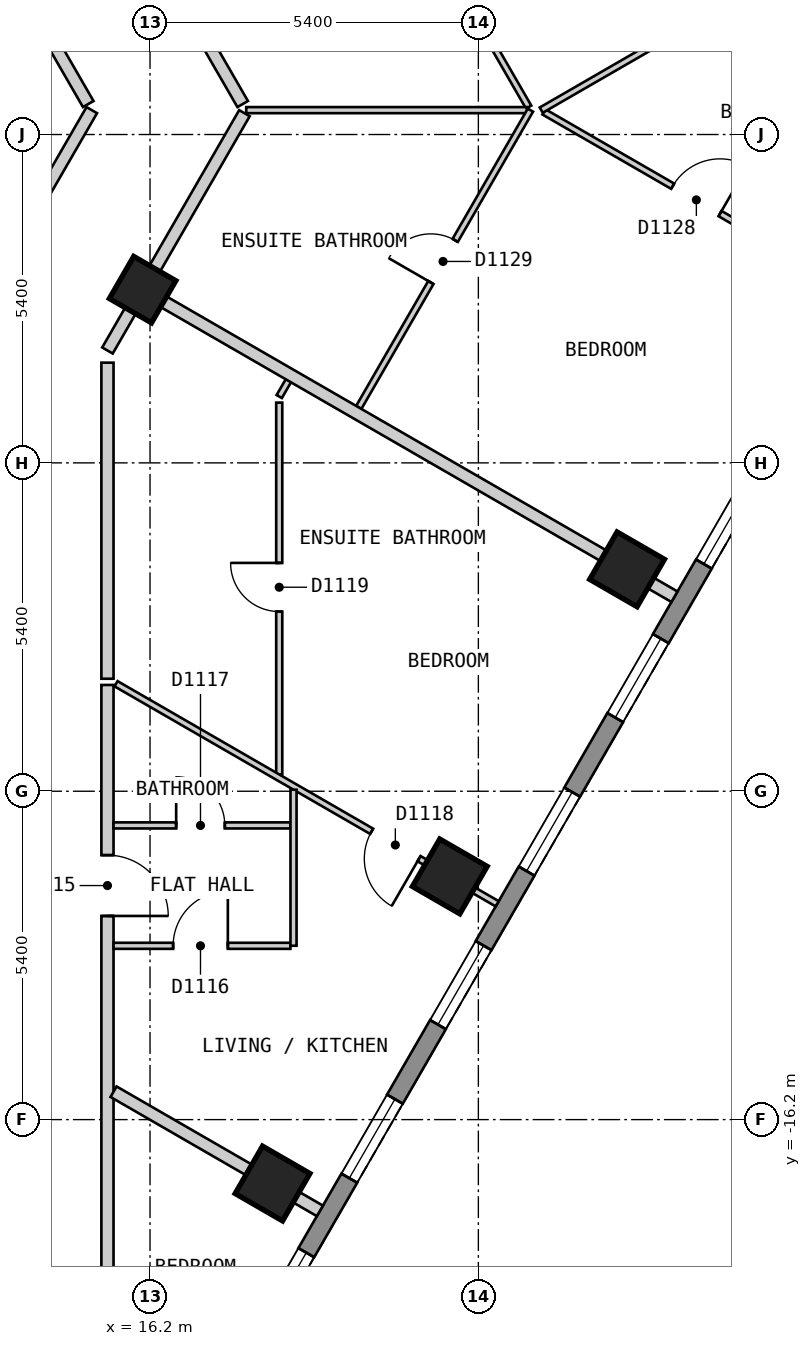
"""IFC4 building model, lengths in metres.
Left out: names, types, materials, properties, quantities, classifications, styles, units other than length and angle.
Written with IfcOpenShell. Run it as: python <this file> out.ifc"""

import sys

from ifc_helpers import new_model, si_unit, direction, frame, frame_2d, origin, origin_2d, place, context, subcontext, project, spatial, polyline, rectangle, outline, extrude, element, fill, save


model = new_model("IFC4")
c1 = context("Model", 3, precision=1e-05, world=origin(), true_north=direction((0.0, 1.0)))
c2 = subcontext(c1, "Body", "Model", "MODEL_VIEW")
j1 = project(units=[si_unit("LENGTHUNIT", "METRE"), si_unit("PLANEANGLEUNIT", "RADIAN")], contexts=[c1])
p1 = place(None, origin())
s1 = spatial("IfcSite", under=j1, at=p1, CompositionType="ELEMENT")
p2 = place(p1, origin())
s2 = spatial("IfcBuilding", under=s1, at=p2, CompositionType="ELEMENT")
p3 = place(p2, frame((0.0, 0.0, 138.6)))
s3 = spatial("IfcBuildingStorey", under=s2, at=p3, CompositionType="ELEMENT", Elevation=138.6)
for number, where, z_axis, x_axis in (
    (1, (18.215, -17.251, 0.0), (0.0, 0.0, 1.0), (0.5, 0.866, 0.0)),
    (2, (21.13, -12.201, 0.0), (0.0, 0.0, 1.0), (0.5, 0.866, 0.0)),
    (3, (24.046, -7.151, 0.0), (0.0, 0.0, 1.0), (0.5, 0.866, 0.0)),
):
    element("IfcColumn", number, at=place(p3, frame(where, z_axis=z_axis, x_axis=x_axis)), inside=s3, PredefinedType="COLUMN", context=c2, shape_type="SweptSolid", body=[
        extrude(rectangle(XDim=0.9, YDim=0.9, at=origin_2d()), origin(), (0.0, 0.0, 1.0), 3.0),
    ])
p4 = place(p3, frame((16.078, -2.551, 0.0), z_axis=(0.0, 0.0, 1.0), x_axis=(0.5, 0.866025403784, 0.0)))
e4 = element("IfcColumn", 4, at=p4, inside=s3, PredefinedType="COLUMN", context=c2, shape_type="SweptSolid", body=[
    extrude(rectangle(XDim=0.8, YDim=0.8, at=origin_2d()), origin(), (0.0, 0.0, 1.0), 3.0),
])
p5 = place(p3, frame((15.862, -23.425, 0.0), z_axis=(0.0, 0.0, 1.0), x_axis=(0.500017503135, 0.866015298109, 0.0)))
e5 = element("IfcWall", 5, at=p5, inside=s3, PredefinedType="SOLIDWALL", context=c2, shape_type="SweptSolid", body=[
    extrude(outline(polyline([(0.0, -0.15), (24.711, -0.15), (24.631, 0.15), (0.08, 0.15), (0.0, -0.15)])), origin(), (0.0, 0.0, 1.0), 2.7),
])
p6 = place(p5, frame((1.4, 0.0, 0.15)))
e6 = element("IfcOpeningElement", 6, at=p6, cuts=e5, PredefinedType="OPENING", context=c2, shape_type="SweptSolid", body=[
    extrude(rectangle(XDim=1.5, YDim=2.1, at=frame_2d((0.75, 1.05))), frame((0.0, 0.16, 0.0), z_axis=(0.0, -1.0, 0.0), x_axis=(1.0, 0.0, 0.0)), (0.0, 0.0, 1.0), 0.32),
])
p7 = place(p5, frame((4.316, 0.0, 0.15)))
e7 = element("IfcOpeningElement", 7, at=p7, cuts=e5, PredefinedType="OPENING", context=c2, shape_type="SweptSolid", body=[
    extrude(rectangle(XDim=1.5, YDim=2.1, at=frame_2d((0.75, 1.05))), frame((0.0, 0.16, 0.0), z_axis=(0.0, -1.0, 0.0), x_axis=(1.0, 0.0, 0.0)), (0.0, 0.0, 1.0), 0.32),
])
p8 = place(p5, frame((7.231, 0.0, 0.15)))
e8 = element("IfcOpeningElement", 8, at=p8, cuts=e5, PredefinedType="OPENING", context=c2, shape_type="SweptSolid", body=[
    extrude(rectangle(XDim=1.5, YDim=2.1, at=frame_2d((0.75, 1.05))), frame((0.0, 0.16, 0.0), z_axis=(0.0, -1.0, 0.0), x_axis=(1.0, 0.0, 0.0)), (0.0, 0.0, 1.0), 0.32),
])
p9 = place(p5, frame((10.147, 0.0, 0.15)))
e9 = element("IfcOpeningElement", 9, at=p9, cuts=e5, PredefinedType="OPENING", context=c2, shape_type="SweptSolid", body=[
    extrude(rectangle(XDim=1.5, YDim=2.1, at=frame_2d((0.75, 1.05))), frame((0.0, 0.16, 0.0), z_axis=(0.0, -1.0, 0.0), x_axis=(1.0, 0.0, 0.0)), (0.0, 0.0, 1.0), 0.32),
])
p10 = place(p5, frame((13.062, 0.0, 0.15)))
e10 = element("IfcOpeningElement", 10, at=p10, cuts=e5, PredefinedType="OPENING", context=c2, shape_type="SweptSolid", body=[
    extrude(rectangle(XDim=1.5, YDim=2.1, at=frame_2d((0.75, 1.05))), frame((0.0, 0.16, 0.0), z_axis=(0.0, -1.0, 0.0), x_axis=(1.0, 0.0, 0.0)), (0.0, 0.0, 1.0), 0.32),
])
p11 = place(p5, frame((15.977, 0.0, 0.15)))
e11 = element("IfcOpeningElement", 11, at=p11, cuts=e5, PredefinedType="OPENING", context=c2, shape_type="SweptSolid", body=[
    extrude(rectangle(XDim=1.5, YDim=2.1, at=frame_2d((0.75, 1.05))), frame((0.0, 0.16, 0.0), z_axis=(0.0, -1.0, 0.0), x_axis=(1.0, 0.0, 0.0)), (0.0, 0.0, 1.0), 0.32),
])
p12 = place(p5, frame((18.893, 0.0, 0.15)))
e12 = element("IfcOpeningElement", 12, at=p12, cuts=e5, PredefinedType="OPENING", context=c2, shape_type="SweptSolid", body=[
    extrude(rectangle(XDim=1.5, YDim=2.1, at=frame_2d((0.75, 1.05))), frame((0.0, 0.16, 0.0), z_axis=(0.0, -1.0, 0.0), x_axis=(1.0, 0.0, 0.0)), (0.0, 0.0, 1.0), 0.32),
])
p13 = place(p5, frame((21.809, 0.0, 0.15)))
e13 = element("IfcOpeningElement", 13, at=p13, cuts=e5, PredefinedType="OPENING", context=c2, shape_type="SweptSolid", body=[
    extrude(rectangle(XDim=1.5, YDim=2.1, at=frame_2d((0.75, 1.05))), frame((0.0, 0.16, 0.0), z_axis=(0.0, -1.0, 0.0), x_axis=(1.0, 0.0, 0.0)), (0.0, 0.0, 1.0), 0.32),
])
p14 = place(p3, frame((7.967, 13.0, 0.0), z_axis=(0.0, 0.0, 1.0), x_axis=(0.50003774998, -0.866003607726, 0.0)))
e14 = element("IfcWall", 14, at=p14, inside=s3, PredefinedType="PARTITIONING", context=c2, shape_type="SweptSolid", body=[
    extrude(rectangle(XDim=14.433, YDim=0.2, at=frame_2d((7.217, 0.0))), origin(), (0.0, 0.0, 1.0), 2.7),
])
p15 = place(p14, frame((6.824, 0.0, 0.0)))
e15 = element("IfcOpeningElement", 15, at=p15, cuts=e14, PredefinedType="OPENING", context=c2, shape_type="SweptSolid", body=[
    extrude(rectangle(XDim=0.9, YDim=2.1, at=frame_2d((0.45, 1.05))), frame((0.0, 0.11, 0.0), z_axis=(0.0, -1.0, 0.0), x_axis=(1.0, 0.0, 0.0)), (0.0, 0.0, 1.0), 0.22),
])
p16 = place(p3, frame((9.296, 15.1, 0.0), z_axis=(0.0, 0.0, 1.0), x_axis=(0.499974024244, -0.866040400375, 0.0)))
e16 = element("IfcWall", 16, at=p16, inside=s3, PredefinedType="PARTITIONING", context=c2, shape_type="SweptSolid", body=[
    extrude(rectangle(XDim=16.857, YDim=0.2, at=frame_2d((8.429, 0.0))), origin(), (0.0, 0.0, 1.0), 2.7),
])
p17 = place(p16, frame((11.522, 0.0, 0.0)))
e17 = element("IfcOpeningElement", 17, at=p17, cuts=e16, PredefinedType="OPENING", context=c2, shape_type="SweptSolid", body=[
    extrude(rectangle(XDim=1.0, YDim=2.1, at=frame_2d((0.5, 1.05))), frame((0.0, 0.11, 0.0), z_axis=(0.0, -1.0, 0.0), x_axis=(1.0, 0.0, 0.0)), (0.0, 0.0, 1.0), 0.22),
])
p18 = place(p3, frame((15.5, -3.752, 0.0), z_axis=(0.0, 0.0, 1.0), x_axis=(0.0, -1.0, 0.0)))
e18 = element("IfcWall", 18, at=p18, inside=s3, PredefinedType="PARTITIONING", context=c2, shape_type="SweptSolid", body=[
    extrude(rectangle(XDim=5.198, YDim=0.2, at=frame_2d((2.599, 0.0))), origin(), (0.0, 0.0, 1.0), 2.7),
])
p19 = place(p3, frame((13.394, -2.8, 0.0), z_axis=(0.0, 0.0, 1.0), x_axis=(0.499968324138, 0.866043691079, 0.0)))
e19 = element("IfcWall", 19, at=p19, inside=s3, PredefinedType="PARTITIONING", context=c2, shape_type="SweptSolid", body=[
    extrude(rectangle(XDim=3.696, YDim=0.2, at=frame_2d((1.848, 0.0))), origin(), (0.0, 0.0, 1.0), 2.7),
])
p20 = place(p3, frame((15.5, -3.552, 0.0), z_axis=(0.0, 0.0, 1.0), x_axis=(0.499914724673, 0.86607463192, 0.0)))
e20 = element("IfcWall", 20, at=p20, inside=s3, PredefinedType="PARTITIONING", context=c2, shape_type="SweptSolid", body=[
    extrude(rectangle(XDim=4.507, YDim=0.2, at=frame_2d((2.253, 0.0))), origin(), (0.0, 0.0, 1.0), 2.7),
])
p21 = place(p3, frame((15.5, -21.199, 0.0), z_axis=(0.0, 0.0, 1.0), x_axis=(0.0, 1.0, 0.0)))
e21 = element("IfcWall", 21, at=p21, inside=s3, PredefinedType="PARTITIONING", context=c2, shape_type="SweptSolid", body=[
    extrude(rectangle(XDim=12.147, YDim=0.2, at=frame_2d((6.073, 0.0))), origin(), (0.0, 0.0, 1.0), 2.7),
])
p22 = place(p21, frame((8.348, 0.0, 0.0)))
e22 = element("IfcOpeningElement", 22, at=p22, cuts=e21, PredefinedType="OPENING", context=c2, shape_type="SweptSolid", body=[
    extrude(rectangle(XDim=1.0, YDim=2.1, at=frame_2d((0.5, 1.05))), frame((0.0, 0.11, 0.0), z_axis=(0.0, -1.0, 0.0), x_axis=(1.0, 0.0, 0.0)), (0.0, 0.0, 1.0), 0.22),
])
p23 = place(p3, frame((14.323, 14.487, 0.0), z_axis=(0.0, 0.0, 1.0), x_axis=(0.500011052545, -0.866019022501, 0.0)))
e23 = element("IfcWall", 23, at=p23, inside=s3, PredefinedType="PARTITIONING", context=c2, shape_type="SweptSolid", body=[
    extrude(rectangle(XDim=16.208, YDim=0.1, at=frame_2d((8.104, 0.0))), origin(), (0.0, 0.0, 1.0), 2.7),
])
p24 = place(p23, frame((8.484, 0.0, 0.0)))
e24 = element("IfcOpeningElement", 24, at=p24, cuts=e23, PredefinedType="OPENING", context=c2, shape_type="SweptSolid", body=[
    extrude(rectangle(XDim=0.9, YDim=2.1, at=frame_2d((0.45, 1.05))), frame((0.0, 0.06, 0.0), z_axis=(0.0, -1.0, 0.0), x_axis=(1.0, 0.0, 0.0)), (0.0, 0.0, 1.0), 0.12),
])
p25 = place(p23, frame((2.252, 0.0, 0.0)))
e25 = element("IfcOpeningElement", 25, at=p25, cuts=e23, PredefinedType="OPENING", context=c2, shape_type="SweptSolid", body=[
    extrude(rectangle(XDim=0.8, YDim=2.1, at=frame_2d((0.4, 1.05))), frame((0.0, 0.06, 0.0), z_axis=(0.0, -1.0, 0.0), x_axis=(1.0, 0.0, 0.0)), (0.0, 0.0, 1.0), 0.12),
])
p26 = place(p23, frame((13.167, 0.0, 0.0)))
e26 = element("IfcOpeningElement", 26, at=p26, cuts=e23, PredefinedType="OPENING", context=c2, shape_type="SweptSolid", body=[
    extrude(rectangle(XDim=0.8, YDim=2.1, at=frame_2d((0.4, 1.05))), frame((0.0, 0.06, 0.0), z_axis=(0.0, -1.0, 0.0), x_axis=(1.0, 0.0, 0.0)), (0.0, 0.0, 1.0), 0.12),
])
p27 = place(p3, frame((18.325, -4.409, 0.0), z_axis=(0.0, 0.0, 1.0), x_axis=(0.0, -1.0, 0.0)))
e27 = element("IfcWall", 27, at=p27, inside=s3, PredefinedType="PARTITIONING", context=c2, shape_type="SweptSolid", body=[
    extrude(rectangle(XDim=6.115, YDim=0.1, at=frame_2d((3.058, 0.0))), origin(), (0.0, 0.0, 1.0), 2.7),
])
p28 = place(p27, frame((2.636, 0.0, 0.0)))
e28 = element("IfcOpeningElement", 28, at=p28, cuts=e27, PredefinedType="OPENING", context=c2, shape_type="SweptSolid", body=[
    extrude(rectangle(XDim=0.8, YDim=2.1, at=frame_2d((0.4, 1.05))), frame((0.0, 0.06, 0.0), z_axis=(0.0, -1.0, 0.0), x_axis=(1.0, 0.0, 0.0)), (0.0, 0.0, 1.0), 0.12),
])
p29 = place(p3, frame((15.641, -9.032, 0.0), z_axis=(0.0, 0.0, 1.0), x_axis=(0.866049104564, -0.499958946799, 0.0)))
e29 = element("IfcWall", 29, at=p29, inside=s3, PredefinedType="PARTITIONING", context=c2, shape_type="SweptSolid", body=[
    extrude(rectangle(XDim=7.238, YDim=0.1, at=frame_2d((3.619, 0.0))), origin(), (0.0, 0.0, 1.0), 2.7),
])
p30 = place(p29, frame((4.854, 0.0, 0.0)))
e30 = element("IfcOpeningElement", 30, at=p30, cuts=e29, PredefinedType="OPENING", context=c2, shape_type="SweptSolid", body=[
    extrude(rectangle(XDim=0.9, YDim=2.1, at=frame_2d((0.45, 1.05))), frame((0.0, 0.06, 0.0), z_axis=(0.0, -1.0, 0.0), x_axis=(1.0, 0.0, 0.0)), (0.0, 0.0, 1.0), 0.12),
])
p31 = place(p3, frame((22.679, 0.372, 0.0), z_axis=(0.0, 0.0, 1.0), x_axis=(0.865985260119, -0.500069524424, 0.0)))
e31 = element("IfcWall", 31, at=p31, inside=s3, PredefinedType="PARTITIONING", context=c2, shape_type="SweptSolid", body=[
    extrude(rectangle(XDim=5.845, YDim=0.1, at=frame_2d((2.923, 0.0))), origin(), (0.0, 0.0, 1.0), 2.7),
])
p32 = place(p31, frame((2.444, 0.0, 0.0)))
e32 = element("IfcOpeningElement", 32, at=p32, cuts=e31, PredefinedType="OPENING", context=c2, shape_type="SweptSolid", body=[
    extrude(rectangle(XDim=0.9, YDim=2.1, at=frame_2d((0.45, 1.05))), frame((0.0, 0.06, 0.0), z_axis=(0.0, -1.0, 0.0), x_axis=(1.0, 0.0, 0.0)), (0.0, 0.0, 1.0), 0.12),
])
p33 = place(p3, frame((15.6, -11.362, 0.0), z_axis=(0.0, 0.0, 1.0), x_axis=(1.0, 0.0, 0.0)))
e33 = element("IfcWall", 33, at=p33, inside=s3, PredefinedType="PARTITIONING", context=c2, shape_type="SweptSolid", body=[
    extrude(rectangle(XDim=2.91, YDim=0.1, at=frame_2d((1.455, 0.0))), origin(), (0.0, 0.0, 1.0), 2.7),
])
p34 = place(p33, frame((1.03, 0.0, 0.0)))
e34 = element("IfcOpeningElement", 34, at=p34, cuts=e33, PredefinedType="OPENING", context=c2, shape_type="SweptSolid", body=[
    extrude(rectangle(XDim=0.8, YDim=2.1, at=frame_2d((0.4, 1.05))), frame((0.0, 0.06, 0.0), z_axis=(0.0, -1.0, 0.0), x_axis=(1.0, 0.0, 0.0)), (0.0, 0.0, 1.0), 0.12),
])
p35 = place(p3, frame((15.6, -13.342, 0.0), z_axis=(0.0, 0.0, 1.0), x_axis=(1.0, 0.0, 0.0)))
e35 = element("IfcWall", 35, at=p35, inside=s3, PredefinedType="PARTITIONING", context=c2, shape_type="SweptSolid", body=[
    extrude(rectangle(XDim=2.909, YDim=0.1, at=frame_2d((1.455, 0.0))), origin(), (0.0, 0.0, 1.0), 2.7),
])
p36 = place(p35, frame((0.98, 0.0, 0.0)))
e36 = element("IfcOpeningElement", 36, at=p36, cuts=e35, PredefinedType="OPENING", context=c2, shape_type="SweptSolid", body=[
    extrude(rectangle(XDim=0.9, YDim=2.1, at=frame_2d((0.45, 1.05))), frame((0.0, 0.06, 0.0), z_axis=(0.0, -1.0, 0.0), x_axis=(1.0, 0.0, 0.0)), (0.0, 0.0, 1.0), 0.12),
])
p37 = place(p3, frame((17.782, 0.401, 0.0), z_axis=(0.0, 0.0, 1.0), x_axis=(1.0, 0.0, 0.0)))
e37 = element("IfcWall", 37, at=p37, inside=s3, PredefinedType="PARTITIONING", context=c2, shape_type="SweptSolid", body=[
    extrude(rectangle(XDim=4.616, YDim=0.1, at=frame_2d((2.308, 0.0))), origin(), (0.0, 0.0, 1.0), 2.7),
])
p38 = place(p3, frame((18.325, -4.309, 0.0), z_axis=(0.0, 0.0, 1.0), x_axis=(0.5014706583, 0.865174652232, 0.0)))
e38 = element("IfcWall", 38, at=p38, inside=s3, PredefinedType="PARTITIONING", context=c2, shape_type="SweptSolid", body=[
    extrude(rectangle(XDim=0.399, YDim=0.1, at=frame_2d((0.199, 0.0))), origin(), (0.0, 0.0, 1.0), 2.7),
])
p39 = place(p3, frame((19.633, -4.488, 0.0), z_axis=(0.0, 0.0, 1.0), x_axis=(0.500050624552, 0.865996173713, 0.0)))
e39 = element("IfcWall", 39, at=p39, inside=s3, PredefinedType="PARTITIONING", context=c2, shape_type="SweptSolid", body=[
    extrude(rectangle(XDim=5.646, YDim=0.1, at=frame_2d((2.823, 0.0))), origin(), (0.0, 0.0, 1.0), 2.7),
])
p40 = place(p39, frame((2.372, 0.0, 0.0)))
e40 = element("IfcOpeningElement", 40, at=p40, cuts=e39, PredefinedType="OPENING", context=c2, shape_type="SweptSolid", body=[
    extrude(rectangle(XDim=0.8, YDim=2.1, at=frame_2d((0.4, 1.05))), frame((0.0, 0.06, 0.0), z_axis=(0.0, -1.0, 0.0), x_axis=(1.0, 0.0, 0.0)), (0.0, 0.0, 1.0), 0.12),
])
p41 = place(p3, frame((18.56, -13.341, 0.0), z_axis=(0.0, 0.0, 1.0), x_axis=(0.0, 1.0, 0.0)))
e41 = element("IfcWall", 41, at=p41, inside=s3, PredefinedType="PARTITIONING", context=c2, shape_type="SweptSolid", body=[
    extrude(rectangle(XDim=2.566, YDim=0.1, at=frame_2d((1.283, 0.0))), origin(), (0.0, 0.0, 1.0), 2.7),
])
p42 = place(p3, frame((22.634, 0.401, 0.0), z_axis=(0.0, 0.0, 1.0), x_axis=(0.86601325737, 0.500021037617, 0.0)))
e42 = element("IfcWall", 42, at=p42, inside=s3, PredefinedType="PARTITIONING", context=c2, shape_type="SweptSolid", body=[
    extrude(rectangle(XDim=5.898, YDim=0.1, at=frame_2d((2.949, 0.0))), origin(), (0.0, 0.0, 1.0), 2.7),
])
p43 = place(p42, frame((2.499, 0.0, 0.0)))
e43 = element("IfcOpeningElement", 43, at=p43, cuts=e42, PredefinedType="OPENING", context=c2, shape_type="SweptSolid", body=[
    extrude(rectangle(XDim=0.9, YDim=2.1, at=frame_2d((0.45, 1.05))), frame((0.0, 0.06, 0.0), z_axis=(0.0, -1.0, 0.0), x_axis=(1.0, 0.0, 0.0)), (0.0, 0.0, 1.0), 0.12),
])
p44 = place(p3, frame((15.6, -15.741, 0.0), z_axis=(0.0, 0.0, 1.0), x_axis=(0.865964599155, -0.500105301922, 0.0)))
e44 = element("IfcWall", 44, at=p44, inside=s3, PredefinedType="PARTITIONING", context=c2, shape_type="SweptSolid", body=[
    extrude(rectangle(XDim=3.919, YDim=0.2, at=frame_2d((1.959, 0.0))), origin(), (0.0, 0.0, 1.0), 2.7),
])
p45 = place(p3, frame((16.165, -2.601, 0.0), z_axis=(0.0, 0.0, 1.0), x_axis=(0.866016855193, -0.500014806302, 0.0)))
e45 = element("IfcWall", 45, at=p45, inside=s3, PredefinedType="PARTITIONING", context=c2, shape_type="SweptSolid", body=[
    extrude(rectangle(XDim=10.0, YDim=0.2, at=frame_2d((5.0, 0.0))), origin(), (0.0, 0.0, 1.0), 2.7),
])
p46 = place(p7, origin())
e46 = element("IfcWindow", 46, at=p46, inside=s3, PartitioningType="SINGLE_PANEL", PredefinedType="WINDOW", context=c2, shape_type="SweptSolid", body=[
    extrude(rectangle(XDim=1.5, YDim=2.1, at=frame_2d((0.75, 1.05))), frame((0.0, 0.03, 0.0), z_axis=(0.0, -1.0, 0.0), x_axis=(1.0, 0.0, 0.0)), (0.0, 0.0, 1.0), 0.06),
])
fill(e7, e46)
p47 = place(p8, origin())
e47 = element("IfcWindow", 47, at=p47, inside=s3, PartitioningType="SINGLE_PANEL", PredefinedType="WINDOW", context=c2, shape_type="SweptSolid", body=[
    extrude(rectangle(XDim=1.5, YDim=2.1, at=frame_2d((0.75, 1.05))), frame((0.0, 0.03, 0.0), z_axis=(0.0, -1.0, 0.0), x_axis=(1.0, 0.0, 0.0)), (0.0, 0.0, 1.0), 0.06),
])
fill(e8, e47)
p48 = place(p9, origin())
e48 = element("IfcWindow", 48, at=p48, inside=s3, PartitioningType="SINGLE_PANEL", PredefinedType="WINDOW", context=c2, shape_type="SweptSolid", body=[
    extrude(rectangle(XDim=1.5, YDim=2.1, at=frame_2d((0.75, 1.05))), frame((0.0, 0.03, 0.0), z_axis=(0.0, -1.0, 0.0), x_axis=(1.0, 0.0, 0.0)), (0.0, 0.0, 1.0), 0.06),
])
fill(e9, e48)
p49 = place(p10, origin())
e49 = element("IfcWindow", 49, at=p49, inside=s3, PartitioningType="SINGLE_PANEL", PredefinedType="WINDOW", context=c2, shape_type="SweptSolid", body=[
    extrude(rectangle(XDim=1.5, YDim=2.1, at=frame_2d((0.75, 1.05))), frame((0.0, 0.03, 0.0), z_axis=(0.0, -1.0, 0.0), x_axis=(1.0, 0.0, 0.0)), (0.0, 0.0, 1.0), 0.06),
])
fill(e10, e49)
p50 = place(p11, origin())
e50 = element("IfcWindow", 50, at=p50, inside=s3, PartitioningType="SINGLE_PANEL", PredefinedType="WINDOW", context=c2, shape_type="SweptSolid", body=[
    extrude(rectangle(XDim=1.5, YDim=2.1, at=frame_2d((0.75, 1.05))), frame((0.0, 0.03, 0.0), z_axis=(0.0, -1.0, 0.0), x_axis=(1.0, 0.0, 0.0)), (0.0, 0.0, 1.0), 0.06),
])
fill(e11, e50)
p51 = place(p12, origin())
e51 = element("IfcWindow", 51, at=p51, inside=s3, PartitioningType="SINGLE_PANEL", PredefinedType="WINDOW", context=c2, shape_type="SweptSolid", body=[
    extrude(rectangle(XDim=1.5, YDim=2.1, at=frame_2d((0.75, 1.05))), frame((0.0, 0.03, 0.0), z_axis=(0.0, -1.0, 0.0), x_axis=(1.0, 0.0, 0.0)), (0.0, 0.0, 1.0), 0.06),
])
fill(e12, e51)
p52 = place(p22, origin())
e52 = element("IfcDoor", 52, at=p52, inside=s3, OperationType="SINGLE_SWING_LEFT", PredefinedType="DOOR", context=c2, shape_type="SweptSolid", body=[
    extrude(rectangle(XDim=1.0, YDim=2.1, at=frame_2d((0.5, 1.05))), frame((0.0, 0.025, 0.0), z_axis=(0.0, -1.0, 0.0), x_axis=(1.0, 0.0, 0.0)), (0.0, 0.0, 1.0), 0.05),
])
fill(e22, e52)
p53 = place(p36, origin())
e53 = element("IfcDoor", 53, at=p53, inside=s3, OperationType="SINGLE_SWING_RIGHT", PredefinedType="DOOR", context=c2, shape_type="SweptSolid", body=[
    extrude(rectangle(XDim=0.9, YDim=2.1, at=frame_2d((0.45, 1.05))), frame((0.0, 0.025, 0.0), z_axis=(0.0, -1.0, 0.0), x_axis=(1.0, 0.0, 0.0)), (0.0, 0.0, 1.0), 0.05),
])
fill(e36, e53)
p54 = place(p34, origin())
e54 = element("IfcDoor", 54, at=p54, inside=s3, OperationType="SINGLE_SWING_LEFT", PredefinedType="DOOR", context=c2, shape_type="SweptSolid", body=[
    extrude(rectangle(XDim=0.8, YDim=2.1, at=frame_2d((0.4, 1.05))), frame((0.0, 0.025, 0.0), z_axis=(0.0, -1.0, 0.0), x_axis=(1.0, 0.0, 0.0)), (0.0, 0.0, 1.0), 0.05),
])
fill(e34, e54)
p55 = place(p30, origin())
e55 = element("IfcDoor", 55, at=p55, inside=s3, OperationType="SINGLE_SWING_RIGHT", PredefinedType="DOOR", context=c2, shape_type="SweptSolid", body=[
    extrude(rectangle(XDim=0.9, YDim=2.1, at=frame_2d((0.45, 1.05))), frame((0.0, 0.025, 0.0), z_axis=(0.0, -1.0, 0.0), x_axis=(1.0, 0.0, 0.0)), (0.0, 0.0, 1.0), 0.05),
])
fill(e30, e55)
p56 = place(p28, origin())
e56 = element("IfcDoor", 56, at=p56, inside=s3, OperationType="SINGLE_SWING_LEFT", PredefinedType="DOOR", context=c2, shape_type="SweptSolid", body=[
    extrude(rectangle(XDim=0.8, YDim=2.1, at=frame_2d((0.4, 1.05))), frame((0.0, 0.025, 0.0), z_axis=(0.0, -1.0, 0.0), x_axis=(1.0, 0.0, 0.0)), (0.0, 0.0, 1.0), 0.05),
])
fill(e28, e56)
p57 = place(p32, origin())
e57 = element("IfcDoor", 57, at=p57, inside=s3, OperationType="SINGLE_SWING_RIGHT", PredefinedType="DOOR", context=c2, shape_type="SweptSolid", body=[
    extrude(rectangle(XDim=0.9, YDim=2.1, at=frame_2d((0.45, 1.05))), frame((0.0, 0.025, 0.0), z_axis=(0.0, -1.0, 0.0), x_axis=(1.0, 0.0, 0.0)), (0.0, 0.0, 1.0), 0.05),
])
fill(e32, e57)
p58 = place(p40, origin())
e58 = element("IfcDoor", 58, at=p58, inside=s3, OperationType="SINGLE_SWING_LEFT", PredefinedType="DOOR", context=c2, shape_type="SweptSolid", body=[
    extrude(rectangle(XDim=0.8, YDim=2.1, at=frame_2d((0.4, 1.05))), frame((0.0, 0.025, 0.0), z_axis=(0.0, -1.0, 0.0), x_axis=(1.0, 0.0, 0.0)), (0.0, 0.0, 1.0), 0.05),
])
fill(e40, e58)
save(model, sys.argv[1])
